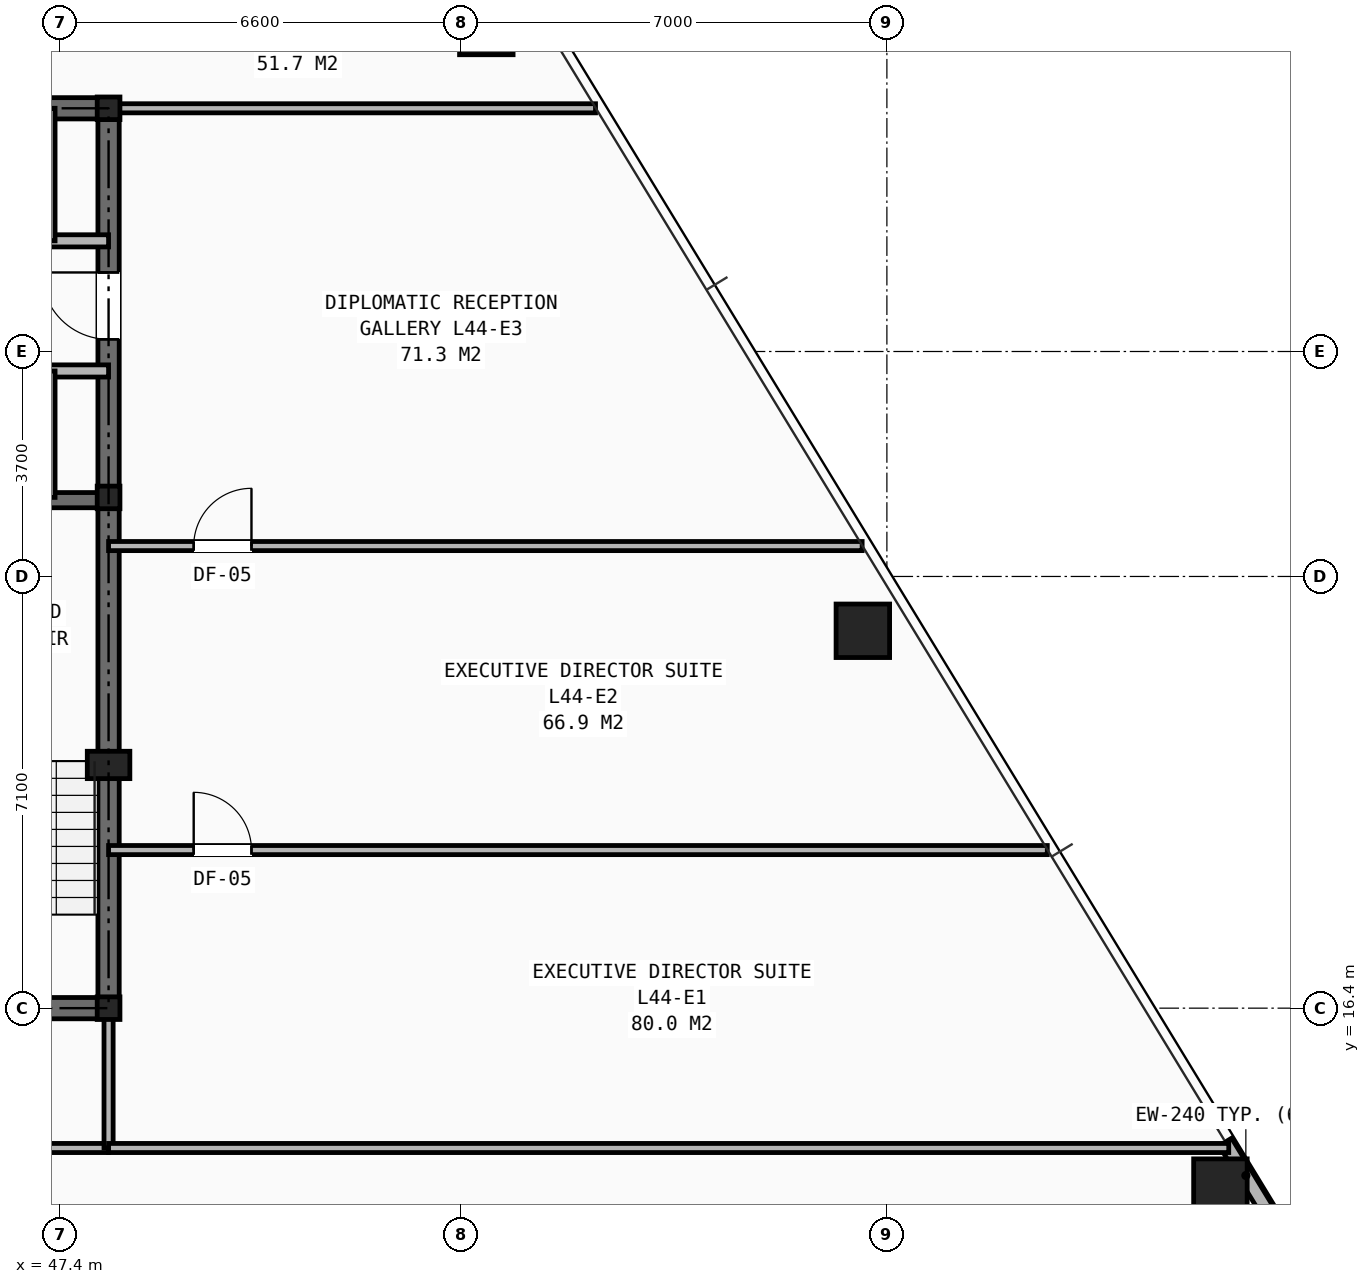
"""IFC4 building model, lengths in metres.
Left out: names, types, materials, properties, quantities, classifications, styles, units other than length and angle.
Written with IfcOpenShell. Run it as: python <this file> out.ifc"""

import sys

from ifc_helpers import new_model, si_unit, direction, frame, frame_2d, origin, origin_2d, place, context, subcontext, project, spatial, rectangle, hollow_rectangle, i_section, extrude, element, fill, save


model = new_model("IFC4")
c1 = context("Model", 3, precision=1e-05, world=origin(), true_north=direction((0.0, 1.0)))
c2 = subcontext(c1, "Body", "Model", "MODEL_VIEW")
j1 = project(units=[si_unit("LENGTHUNIT", "METRE"), si_unit("PLANEANGLEUNIT", "RADIAN")], contexts=[c1])
p1 = place(None, origin())
s1 = spatial("IfcSite", under=j1, at=p1, CompositionType="ELEMENT")
p2 = place(p1, origin())
s2 = spatial("IfcBuilding", under=s1, at=p2, CompositionType="ELEMENT")
p3 = place(p2, frame((0.0, 0.0, 153.95)))
s3 = spatial("IfcBuildingStorey", under=s2, at=p3, CompositionType="ELEMENT", Elevation=153.95)
for number, where, z_axis, x_axis in (
    (1, (48.2, 16.4, 0.0), (0.0, 0.0, 1.0), (1.0, 0.0, 0.0)),
    (2, (48.2, 24.8, 0.0), (0.0, 0.0, 1.0), (1.0, 0.0, 0.0)),
    (3, (48.2, 31.2, 0.0), (0.0, 0.0, 1.0), (1.0, 0.0, 0.0)),
):
    element("IfcColumn", number, at=place(p3, frame(where, z_axis=z_axis, x_axis=x_axis)), inside=s3, PredefinedType="COLUMN", context=c2, shape_type="SweptSolid", body=[
        extrude(i_section(OverallWidth=0.374, OverallDepth=0.372, WebThickness=0.016, FlangeThickness=0.026, at=origin_2d()), origin(), (0.0, 0.0, 1.0), 3.45),
    ])
p4 = place(p3, frame((48.2, 20.4, 0.0), z_axis=(0.0, 0.0, 1.0), x_axis=(1.0, 0.0, 0.0)))
e4 = element("IfcColumn", 4, at=p4, inside=s3, PredefinedType="PILASTER", context=c2, shape_type="SweptSolid", body=[
    extrude(rectangle(XDim=0.7, YDim=0.45, at=origin_2d()), origin(), (0.0, 0.0, 1.0), 3.45),
])
for number, where, z_axis, x_axis in (
    (5, (66.485, 13.481, 0.0), (0.0, 0.0, 1.0), (1.0, 0.0, 0.0)),
    (6, (60.604, 22.606, 0.0), (0.0, 0.0, 1.0), (1.0, 0.0, 0.0)),
    (7, (54.412, 32.521, 0.0), (0.0, 0.0, 1.0), (1.0, 0.0, 0.0)),
):
    element("IfcColumn", number, at=place(p3, frame(where, z_axis=z_axis, x_axis=x_axis)), inside=s3, PredefinedType="COLUMN", context=c2, shape_type="SweptSolid", body=[
        extrude(hollow_rectangle(XDim=0.88, YDim=0.88, WallThickness=0.06, at=origin_2d()), origin(), (0.0, 0.0, 1.0), 3.45),
    ])
p5 = place(p3, frame((67.239, 13.096, 0.0), z_axis=(0.0, 0.0, 1.0), x_axis=(-0.520210782009, 0.854037904476, 0.0)))
e8 = element("IfcWall", 8, at=p5, inside=s3, PredefinedType="SHEAR", context=c2, shape_type="SweptSolid", body=[
    extrude(rectangle(XDim=1.292, YDim=0.24, at=frame_2d((0.646, 0.0))), origin(), (0.0, 0.0, 1.0), 2.523),
])
p6 = place(p3, frame((31.8, 16.4, 0.0), z_axis=(0.0, 0.0, 1.0), x_axis=(1.0, 0.0, 0.0)))
e9 = element("IfcWall", 9, at=p6, inside=s3, PredefinedType="SHEAR", context=c2, shape_type="SweptSolid", body=[
    extrude(rectangle(XDim=16.4, YDim=0.35, at=frame_2d((8.2, 0.0))), origin(), (0.0, 0.0, 1.0), 3.15),
])
p7 = place(p6, frame((7.75, 0.0, 0.0)))
e10 = element("IfcOpeningElement", 10, at=p7, cuts=e9, PredefinedType="OPENING", context=c2, shape_type="SweptSolid", body=[
    extrude(rectangle(XDim=0.9, YDim=2.1, at=frame_2d((0.45, 1.05))), frame((0.0, 0.185, 0.0), z_axis=(0.0, -1.0, 0.0), x_axis=(1.0, 0.0, 0.0)), (0.0, 0.0, 1.0), 0.37),
])
p8 = place(p6, frame((4.2, 0.0, 0.0)))
e11 = element("IfcOpeningElement", 11, at=p8, cuts=e9, PredefinedType="OPENING", context=c2, shape_type="SweptSolid", body=[
    extrude(rectangle(XDim=0.95, YDim=2.1, at=frame_2d((0.475, 1.05))), frame((0.0, 0.185, 0.0), z_axis=(0.0, -1.0, 0.0), x_axis=(1.0, 0.0, 0.0)), (0.0, 0.0, 1.0), 0.37),
])
p9 = place(p6, frame((10.6, 0.0, 0.0)))
e12 = element("IfcOpeningElement", 12, at=p9, cuts=e9, PredefinedType="OPENING", context=c2, shape_type="SweptSolid", body=[
    extrude(rectangle(XDim=0.95, YDim=2.1, at=frame_2d((0.475, 1.05))), frame((0.0, 0.185, 0.0), z_axis=(0.0, -1.0, 0.0), x_axis=(1.0, 0.0, 0.0)), (0.0, 0.0, 1.0), 0.37),
])
p10 = place(p3, frame((31.8, 31.2, 0.0), z_axis=(0.0, 0.0, 1.0), x_axis=(1.0, 0.0, 0.0)))
e13 = element("IfcWall", 13, at=p10, inside=s3, PredefinedType="SHEAR", context=c2, shape_type="SweptSolid", body=[
    extrude(rectangle(XDim=16.4, YDim=0.35, at=frame_2d((8.2, 0.0))), origin(), (0.0, 0.0, 1.0), 3.15),
])
p11 = place(p3, frame((48.2, 16.4, 0.0), z_axis=(0.0, 0.0, 1.0), x_axis=(0.0, 1.0, 0.0)))
e14 = element("IfcWall", 14, at=p11, inside=s3, PredefinedType="SHEAR", context=c2, shape_type="SweptSolid", body=[
    extrude(rectangle(XDim=14.8, YDim=0.35, at=frame_2d((7.4, 0.0))), origin(), (0.0, 0.0, 1.0), 3.15),
])
p12 = place(p11, frame((11.0, 0.0, 0.0)))
e15 = element("IfcOpeningElement", 15, at=p12, cuts=e14, PredefinedType="OPENING", context=c2, shape_type="SweptSolid", body=[
    extrude(rectangle(XDim=1.1, YDim=2.15, at=frame_2d((0.55, 1.075))), frame((0.0, 0.185, 0.0), z_axis=(0.0, -1.0, 0.0), x_axis=(1.0, 0.0, 0.0)), (0.0, 0.0, 1.0), 0.37),
])
p13 = place(p3, frame((44.955, 24.755, 0.0), z_axis=(0.0, 0.0, 1.0), x_axis=(1.0, 0.0, 0.0)))
e16 = element("IfcWall", 16, at=p13, inside=s3, PredefinedType="SHEAR", context=c2, shape_type="SweptSolid", body=[
    extrude(rectangle(XDim=3.245, YDim=0.25, at=frame_2d((1.623, 0.0))), origin(), (0.0, 0.0, 1.0), 3.15),
])
p14 = place(p3, frame((31.8, 29.02, 0.0), z_axis=(0.0, 0.0, 1.0), x_axis=(1.0, 0.0, 0.0)))
e17 = element("IfcWall", 17, at=p14, inside=s3, PredefinedType="SOLIDWALL", context=c2, shape_type="SweptSolid", body=[
    extrude(rectangle(XDim=16.4, YDim=0.2, at=frame_2d((8.2, 0.0))), origin(), (0.0, 0.0, 1.0), 2.601),
])
p15 = place(p14, frame((0.55, 0.0, 0.0)))
e18 = element("IfcOpeningElement", 18, at=p15, cuts=e17, PredefinedType="OPENING", context=c2, shape_type="SweptSolid", body=[
    extrude(rectangle(XDim=0.85, YDim=2.05, at=frame_2d((0.425, 1.025))), frame((0.0, 0.11, 0.0), z_axis=(0.0, -1.0, 0.0), x_axis=(1.0, 0.0, 0.0)), (0.0, 0.0, 1.0), 0.22),
])
p16 = place(p14, frame((5.94, 0.0, 0.0)))
e19 = element("IfcOpeningElement", 19, at=p16, cuts=e17, PredefinedType="OPENING", context=c2, shape_type="SweptSolid", body=[
    extrude(rectangle(XDim=0.9, YDim=2.1, at=frame_2d((0.45, 1.05))), frame((0.0, 0.11, 0.0), z_axis=(0.0, -1.0, 0.0), x_axis=(1.0, 0.0, 0.0)), (0.0, 0.0, 1.0), 0.22),
])
p17 = place(p3, frame((31.8, 26.88, 0.0), z_axis=(0.0, 0.0, 1.0), x_axis=(1.0, 0.0, 0.0)))
e20 = element("IfcWall", 20, at=p17, inside=s3, PredefinedType="SOLIDWALL", context=c2, shape_type="SweptSolid", body=[
    extrude(rectangle(XDim=16.4, YDim=0.2, at=frame_2d((8.2, 0.0))), origin(), (0.0, 0.0, 1.0), 2.601),
])
p18 = place(p17, frame((0.55, 0.0, 0.0)))
e21 = element("IfcOpeningElement", 21, at=p18, cuts=e20, PredefinedType="OPENING", context=c2, shape_type="SweptSolid", body=[
    extrude(rectangle(XDim=0.85, YDim=2.05, at=frame_2d((0.425, 1.025))), frame((0.0, 0.11, 0.0), z_axis=(0.0, -1.0, 0.0), x_axis=(1.0, 0.0, 0.0)), (0.0, 0.0, 1.0), 0.22),
])
p19 = place(p17, frame((2.55, 0.0, 0.0)))
e22 = element("IfcOpeningElement", 22, at=p19, cuts=e20, PredefinedType="OPENING", context=c2, shape_type="SweptSolid", body=[
    extrude(rectangle(XDim=1.1, YDim=2.15, at=frame_2d((0.55, 1.075))), frame((0.0, 0.11, 0.0), z_axis=(0.0, -1.0, 0.0), x_axis=(1.0, 0.0, 0.0)), (0.0, 0.0, 1.0), 0.22),
])
p20 = place(p17, frame((4.71, 0.0, 0.0)))
e23 = element("IfcOpeningElement", 23, at=p20, cuts=e20, PredefinedType="OPENING", context=c2, shape_type="SweptSolid", body=[
    extrude(rectangle(XDim=1.1, YDim=2.15, at=frame_2d((0.55, 1.075))), frame((0.0, 0.11, 0.0), z_axis=(0.0, -1.0, 0.0), x_axis=(1.0, 0.0, 0.0)), (0.0, 0.0, 1.0), 0.22),
])
p21 = place(p17, frame((6.87, 0.0, 0.0)))
e24 = element("IfcOpeningElement", 24, at=p21, cuts=e20, PredefinedType="OPENING", context=c2, shape_type="SweptSolid", body=[
    extrude(rectangle(XDim=1.1, YDim=2.15, at=frame_2d((0.55, 1.075))), frame((0.0, 0.11, 0.0), z_axis=(0.0, -1.0, 0.0), x_axis=(1.0, 0.0, 0.0)), (0.0, 0.0, 1.0), 0.22),
])
p22 = place(p17, frame((9.03, 0.0, 0.0)))
e25 = element("IfcOpeningElement", 25, at=p22, cuts=e20, PredefinedType="OPENING", context=c2, shape_type="SweptSolid", body=[
    extrude(rectangle(XDim=1.1, YDim=2.15, at=frame_2d((0.55, 1.075))), frame((0.0, 0.11, 0.0), z_axis=(0.0, -1.0, 0.0), x_axis=(1.0, 0.0, 0.0)), (0.0, 0.0, 1.0), 0.22),
])
p23 = place(p3, frame((47.24, 29.02, 0.0), z_axis=(0.0, 0.0, 1.0), x_axis=(0.0, 1.0, 0.0)))
e26 = element("IfcWall", 26, at=p23, inside=s3, PredefinedType="SOLIDWALL", context=c2, shape_type="SweptSolid", body=[
    extrude(rectangle(XDim=2.18, YDim=0.16, at=frame_2d((1.09, 0.0))), origin(), (0.0, 0.0, 1.0), 2.601),
])
p24 = place(p3, frame((47.24, 24.8, 0.0), z_axis=(0.0, 0.0, 1.0), x_axis=(0.0, 1.0, 0.0)))
e27 = element("IfcWall", 27, at=p24, inside=s3, PredefinedType="SOLIDWALL", context=c2, shape_type="SweptSolid", body=[
    extrude(rectangle(XDim=2.08, YDim=0.16, at=frame_2d((1.04, 0.0))), origin(), (0.0, 0.0, 1.0), 3.15),
])
p25 = place(p3, frame((29.6, 14.1, 0.0), z_axis=(0.0, 0.0, 1.0), x_axis=(1.0, 0.0, 0.0)))
e28 = element("IfcWall", 28, at=p25, inside=s3, PredefinedType="PARTITIONING", context=c2, shape_type="SweptSolid", body=[
    extrude(rectangle(XDim=18.6, YDim=0.15, at=frame_2d((9.3, 0.0))), origin(), (0.0, 0.0, 1.0), 2.165),
])
p26 = place(p25, frame((0.55, 0.0, 0.0)))
e29 = element("IfcOpeningElement", 29, at=p26, cuts=e28, PredefinedType="OPENING", context=c2, shape_type="SweptSolid", body=[
    extrude(rectangle(XDim=0.95, YDim=2.1, at=frame_2d((0.475, 1.05))), frame((0.0, 0.085, 0.0), z_axis=(0.0, -1.0, 0.0), x_axis=(1.0, 0.0, 0.0)), (0.0, 0.0, 1.0), 0.17),
])
p27 = place(p25, frame((4.75, 0.0, 0.0)))
e30 = element("IfcOpeningElement", 30, at=p27, cuts=e28, PredefinedType="OPENING", context=c2, shape_type="SweptSolid", body=[
    extrude(rectangle(XDim=0.95, YDim=2.1, at=frame_2d((0.475, 1.05))), frame((0.0, 0.085, 0.0), z_axis=(0.0, -1.0, 0.0), x_axis=(1.0, 0.0, 0.0)), (0.0, 0.0, 1.0), 0.17),
])
p28 = place(p25, frame((9.95, 0.0, 0.0)))
e31 = element("IfcOpeningElement", 31, at=p28, cuts=e28, PredefinedType="OPENING", context=c2, shape_type="SweptSolid", body=[
    extrude(rectangle(XDim=0.95, YDim=2.1, at=frame_2d((0.475, 1.05))), frame((0.0, 0.085, 0.0), z_axis=(0.0, -1.0, 0.0), x_axis=(1.0, 0.0, 0.0)), (0.0, 0.0, 1.0), 0.17),
])
p29 = place(p25, frame((14.95, 0.0, 0.0)))
e32 = element("IfcOpeningElement", 32, at=p29, cuts=e28, PredefinedType="OPENING", context=c2, shape_type="SweptSolid", body=[
    extrude(rectangle(XDim=0.95, YDim=2.1, at=frame_2d((0.475, 1.05))), frame((0.0, 0.085, 0.0), z_axis=(0.0, -1.0, 0.0), x_axis=(1.0, 0.0, 0.0)), (0.0, 0.0, 1.0), 0.17),
])
p30 = place(p3, frame((48.2, 14.1, 0.0), z_axis=(0.0, 0.0, 1.0), x_axis=(0.0, 1.0, 0.0)))
e33 = element("IfcWall", 33, at=p30, inside=s3, PredefinedType="PARTITIONING", context=c2, shape_type="SweptSolid", body=[
    extrude(rectangle(XDim=2.3, YDim=0.15, at=frame_2d((1.15, 0.0))), origin(), (0.0, 0.0, 1.0), 2.601),
])
p31 = place(p3, frame((48.2, 31.2, 0.0), z_axis=(0.0, 0.0, 1.0), x_axis=(1.0, 0.0, 0.0)))
e34 = element("IfcWall", 34, at=p31, inside=s3, PredefinedType="PARTITIONING", context=c2, shape_type="SweptSolid", body=[
    extrude(rectangle(XDim=8.008, YDim=0.15, at=frame_2d((4.004, 0.0))), origin(), (0.0, 0.0, 1.0), 2.165),
])
p32 = place(p3, frame((48.2, 14.1, 0.0), z_axis=(0.0, 0.0, 1.0), x_axis=(1.0, 0.0, 0.0)))
e35 = element("IfcWall", 35, at=p32, inside=s3, PredefinedType="PARTITIONING", context=c2, shape_type="SweptSolid", body=[
    extrude(rectangle(XDim=18.422, YDim=0.15, at=frame_2d((9.211, 0.0))), origin(), (0.0, 0.0, 1.0), 2.529),
])
p33 = place(p3, frame((48.2, 19.0, 0.0), z_axis=(0.0, 0.0, 1.0), x_axis=(1.0, 0.0, 0.0)))
e36 = element("IfcWall", 36, at=p33, inside=s3, PredefinedType="PARTITIONING", context=c2, shape_type="SweptSolid", body=[
    extrude(rectangle(XDim=15.438, YDim=0.15, at=frame_2d((7.719, 0.0))), origin(), (0.0, 0.0, 1.0), 2.529),
])
p34 = place(p33, frame((1.4, 0.0, 0.0)))
e37 = element("IfcOpeningElement", 37, at=p34, cuts=e36, PredefinedType="OPENING", context=c2, shape_type="SweptSolid", body=[
    extrude(rectangle(XDim=0.95, YDim=2.1, at=frame_2d((0.475, 1.05))), frame((0.0, 0.085, 0.0), z_axis=(0.0, -1.0, 0.0), x_axis=(1.0, 0.0, 0.0)), (0.0, 0.0, 1.0), 0.17),
])
p35 = place(p3, frame((48.2, 24.0, 0.0), z_axis=(0.0, 0.0, 1.0), x_axis=(1.0, 0.0, 0.0)))
e38 = element("IfcWall", 38, at=p35, inside=s3, PredefinedType="PARTITIONING", context=c2, shape_type="SweptSolid", body=[
    extrude(rectangle(XDim=12.393, YDim=0.15, at=frame_2d((6.197, 0.0))), origin(), (0.0, 0.0, 1.0), 2.529),
])
p36 = place(p35, frame((1.4, 0.0, 0.0)))
e39 = element("IfcOpeningElement", 39, at=p36, cuts=e38, PredefinedType="OPENING", context=c2, shape_type="SweptSolid", body=[
    extrude(rectangle(XDim=0.95, YDim=2.1, at=frame_2d((0.475, 1.05))), frame((0.0, 0.085, 0.0), z_axis=(0.0, -1.0, 0.0), x_axis=(1.0, 0.0, 0.0)), (0.0, 0.0, 1.0), 0.17),
])
p37 = place(p12, origin())
e40 = element("IfcDoor", 40, at=p37, inside=s3, OperationType="SINGLE_SWING_RIGHT", PredefinedType="DOOR", context=c2, shape_type="SweptSolid", body=[
    extrude(rectangle(XDim=1.1, YDim=2.15, at=frame_2d((0.55, 1.075))), frame((0.0, 0.025, 0.0), z_axis=(0.0, -1.0, 0.0), x_axis=(1.0, 0.0, 0.0)), (0.0, 0.0, 1.0), 0.05),
])
fill(e15, e40)
p38 = place(p34, origin())
e41 = element("IfcDoor", 41, at=p38, inside=s3, OperationType="SINGLE_SWING_LEFT", PredefinedType="DOOR", context=c2, shape_type="SweptSolid", body=[
    extrude(rectangle(XDim=0.95, YDim=2.1, at=frame_2d((0.475, 1.05))), frame((0.0, 0.025, 0.0), z_axis=(0.0, -1.0, 0.0), x_axis=(1.0, 0.0, 0.0)), (0.0, 0.0, 1.0), 0.05),
])
fill(e37, e41)
p39 = place(p36, origin())
e42 = element("IfcDoor", 42, at=p39, inside=s3, OperationType="SINGLE_SWING_RIGHT", PredefinedType="DOOR", context=c2, shape_type="SweptSolid", body=[
    extrude(rectangle(XDim=0.95, YDim=2.1, at=frame_2d((0.475, 1.05))), frame((0.0, 0.025, 0.0), z_axis=(0.0, -1.0, 0.0), x_axis=(1.0, 0.0, 0.0)), (0.0, 0.0, 1.0), 0.05),
])
fill(e39, e42)
save(model, sys.argv[1])
